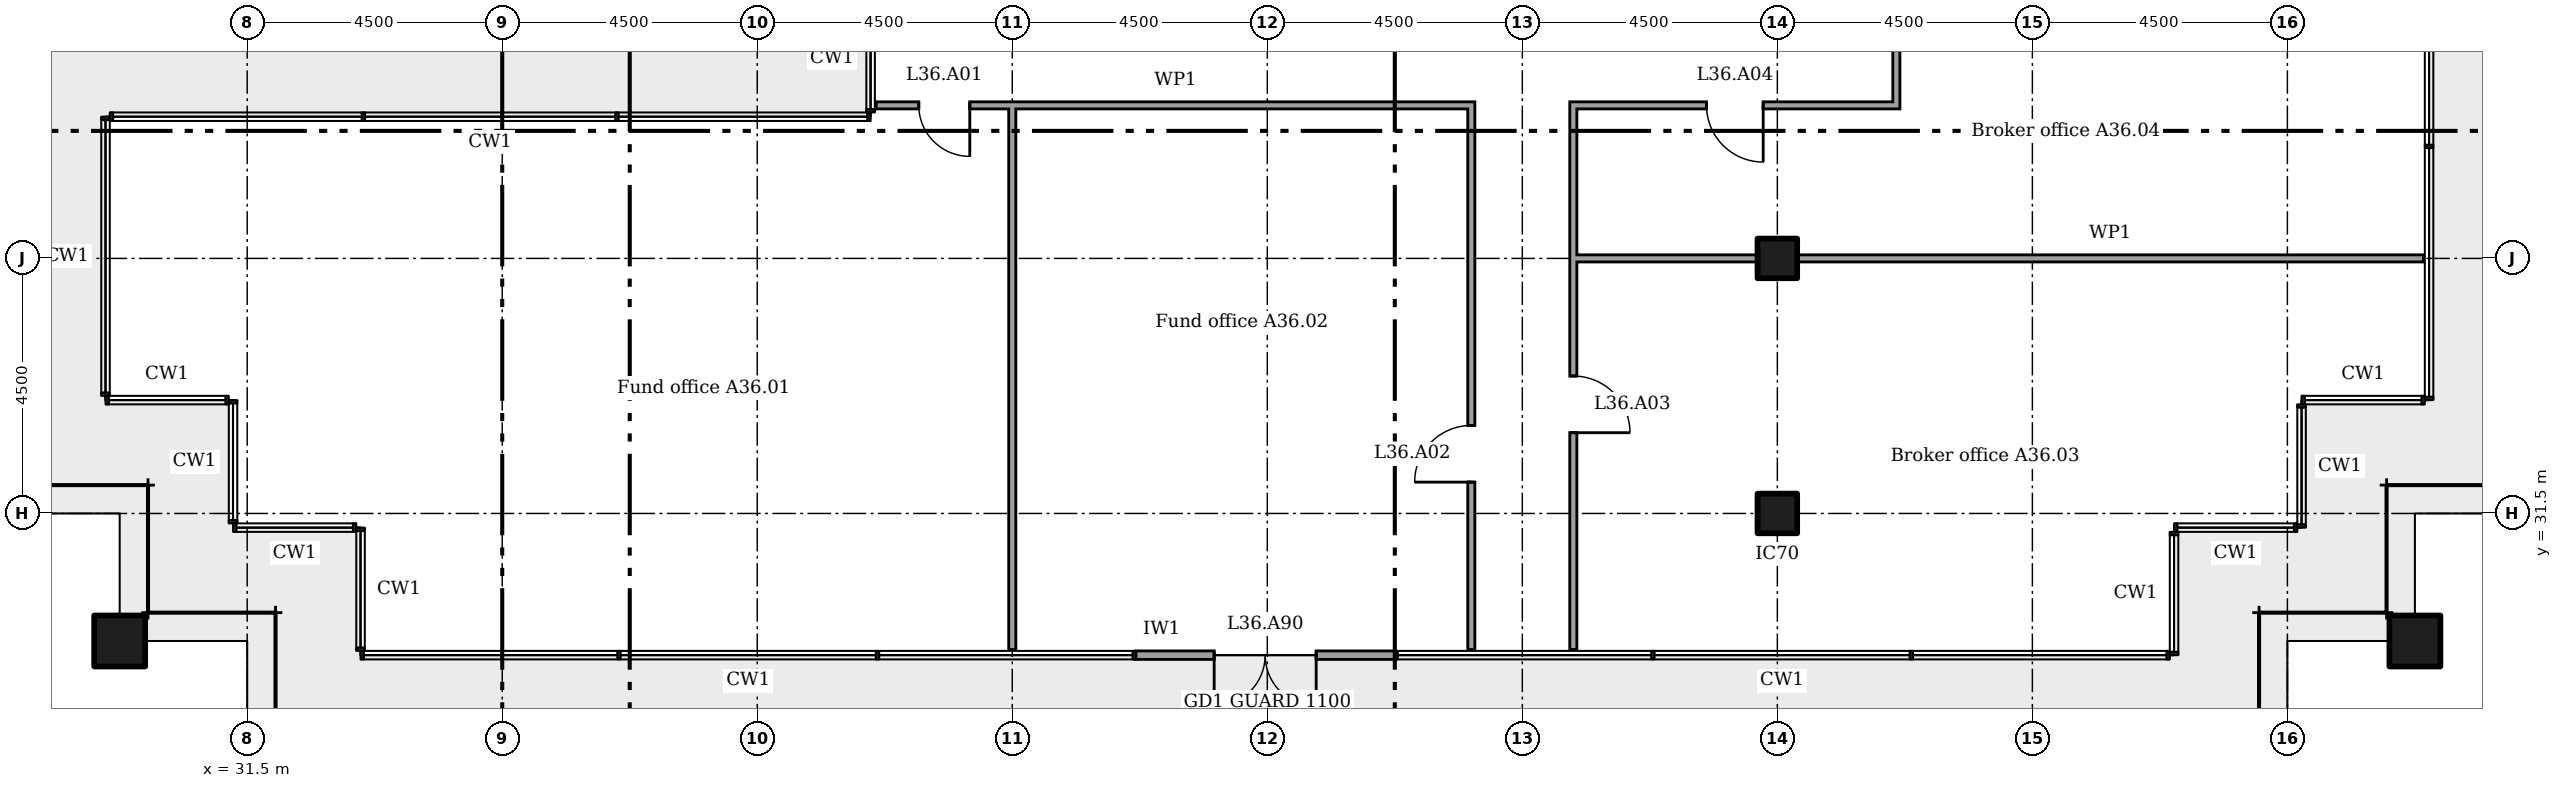
"""IFC4 building model, lengths in metres.
Left out: names, types, materials, properties, quantities, classifications, styles, units other than length and angle.
Written with IfcOpenShell. Run it as: python <this file> out.ifc"""

import sys

from ifc_helpers import new_model, si_unit, direction, frame, frame_2d, origin, origin_2d, place, context, subcontext, project, spatial, rectangle, extrude, element, fill, save


model = new_model("IFC4")
c1 = context("Model", 3, precision=1e-05, world=origin(), true_north=direction((0.0, 1.0)))
c2 = subcontext(c1, "Body", "Model", "MODEL_VIEW")
j1 = project(units=[si_unit("LENGTHUNIT", "METRE"), si_unit("PLANEANGLEUNIT", "RADIAN")], contexts=[c1])
p1 = place(None, origin())
s1 = spatial("IfcSite", under=j1, at=p1, CompositionType="ELEMENT")
p2 = place(p1, origin())
s2 = spatial("IfcBuilding", under=s1, at=p2, CompositionType="ELEMENT")
p3 = place(p2, frame((0.0, 0.0, 147.4)))
s3 = spatial("IfcBuildingStorey", under=s2, at=p3, CompositionType="ELEMENT", Elevation=147.4)
for number, where in (
    (1, (69.75, 29.25, 0.0)),
    (2, (29.25, 29.25, 0.0)),
):
    element("IfcColumn", number, at=place(p3, frame(where)), inside=s3, PredefinedType="COLUMN", context=c2, shape_type="SweptSolid", body=[
        extrude(rectangle(XDim=0.9, YDim=0.9, at=origin_2d()), origin(), (0.0, 0.0, 1.0), 3.6),
    ])
for number, where in (
    (3, (58.5, 31.5, 0.0)),
    (4, (58.5, 36.0, 0.0)),
):
    element("IfcColumn", number, at=place(p3, frame(where)), inside=s3, PredefinedType="COLUMN", context=c2, shape_type="SweptSolid", body=[
        extrude(rectangle(XDim=0.7, YDim=0.7, at=origin_2d()), origin(), (0.0, 0.0, 1.0), 3.6),
    ])
p4 = place(p3, frame((47.182, 29.0, 0.0)))
e5 = element("IfcWall", 5, at=p4, inside=s3, PredefinedType="SOLIDWALL", context=c2, shape_type="SweptSolid", body=[
    extrude(rectangle(XDim=4.561, YDim=0.15, at=frame_2d((2.28, 0.0))), origin(), (0.0, 0.0, 1.0), 3.45),
])
p5 = place(p4, frame((1.38, 0.0, 0.0)))
e6 = element("IfcOpeningElement", 6, at=p5, cuts=e5, PredefinedType="OPENING", context=c2, shape_type="SweptSolid", body=[
    extrude(rectangle(XDim=1.8, YDim=2.4, at=frame_2d((0.9, 1.2))), frame((0.0, 0.085, 0.0), z_axis=(0.0, -1.0, 0.0), x_axis=(1.0, 0.0, 0.0)), (0.0, 0.0, 1.0), 0.17),
])
p6 = place(p3, frame((54.9, 36.0, 0.0)))
e7 = element("IfcWall", 7, at=p6, inside=s3, PredefinedType="PARTITIONING", context=c2, shape_type="SweptSolid", body=[
    extrude(rectangle(XDim=3.25, YDim=0.125, at=frame_2d((1.625, 0.0))), origin(), (0.0, 0.0, 1.0), 3.45),
])
p7 = place(p3, frame((58.85, 36.0, 0.0)))
e8 = element("IfcWall", 8, at=p7, inside=s3, PredefinedType="PARTITIONING", context=c2, shape_type="SweptSolid", body=[
    extrude(rectangle(XDim=11.05, YDim=0.125, at=frame_2d((5.525, 0.0))), origin(), (0.0, 0.0, 1.0), 2.766),
])
p8 = place(p3, frame((42.6, 38.7, 0.0)))
e9 = element("IfcWall", 9, at=p8, inside=s3, PredefinedType="PARTITIONING", context=c2, shape_type="SweptSolid", body=[
    extrude(rectangle(XDim=10.562, YDim=0.125, at=frame_2d((5.281, 0.0))), origin(), (0.0, 0.0, 1.0), 3.45),
])
p9 = place(p8, frame((0.75, 0.0, 0.0)))
e10 = element("IfcOpeningElement", 10, at=p9, cuts=e9, PredefinedType="OPENING", context=c2, shape_type="SweptSolid", body=[
    extrude(rectangle(XDim=0.9, YDim=2.1, at=frame_2d((0.45, 1.05))), frame((0.0, 0.073, 0.0), z_axis=(0.0, -1.0, 0.0), x_axis=(1.0, 0.0, 0.0)), (0.0, 0.0, 1.0), 0.145),
])
p10 = place(p3, frame((54.837, 38.7, 0.0)))
e11 = element("IfcWall", 11, at=p10, inside=s3, PredefinedType="PARTITIONING", context=c2, shape_type="SweptSolid", body=[
    extrude(rectangle(XDim=5.825, YDim=0.125, at=frame_2d((2.913, 0.0))), origin(), (0.0, 0.0, 1.0), 3.45),
])
p11 = place(p10, frame((2.413, 0.0, 0.0)))
e12 = element("IfcOpeningElement", 12, at=p11, cuts=e11, PredefinedType="OPENING", context=c2, shape_type="SweptSolid", body=[
    extrude(rectangle(XDim=1.0, YDim=2.1, at=frame_2d((0.5, 1.05))), frame((0.0, 0.073, 0.0), z_axis=(0.0, -1.0, 0.0), x_axis=(1.0, 0.0, 0.0)), (0.0, 0.0, 1.0), 0.145),
])
p12 = place(p3, frame((45.0, 29.1, 0.0), z_axis=(0.0, 0.0, 1.0), x_axis=(0.0, 1.0, 0.0)))
e13 = element("IfcWall", 13, at=p12, inside=s3, PredefinedType="PARTITIONING", context=c2, shape_type="SweptSolid", body=[
    extrude(rectangle(XDim=9.6, YDim=0.125, at=frame_2d((4.8, 0.0))), origin(), (0.0, 0.0, 1.0), 2.766),
])
p13 = place(p3, frame((53.1, 29.1, 0.0), z_axis=(0.0, 0.0, 1.0), x_axis=(0.0, 1.0, 0.0)))
e14 = element("IfcWall", 14, at=p13, inside=s3, PredefinedType="PARTITIONING", context=c2, shape_type="SweptSolid", body=[
    extrude(rectangle(XDim=9.537, YDim=0.125, at=frame_2d((4.769, 0.0))), origin(), (0.0, 0.0, 1.0), 3.45),
])
p14 = place(p13, frame((2.953, 0.0, 0.0)))
e15 = element("IfcOpeningElement", 15, at=p14, cuts=e14, PredefinedType="OPENING", context=c2, shape_type="SweptSolid", body=[
    extrude(rectangle(XDim=1.0, YDim=2.1, at=frame_2d((0.5, 1.05))), frame((0.0, 0.073, 0.0), z_axis=(0.0, -1.0, 0.0), x_axis=(1.0, 0.0, 0.0)), (0.0, 0.0, 1.0), 0.145),
])
p15 = place(p3, frame((54.9, 29.1, 0.0), z_axis=(0.0, 0.0, 1.0), x_axis=(0.0, 1.0, 0.0)))
e16 = element("IfcWall", 16, at=p15, inside=s3, PredefinedType="PARTITIONING", context=c2, shape_type="SweptSolid", body=[
    extrude(rectangle(XDim=9.537, YDim=0.125, at=frame_2d((4.769, 0.0))), origin(), (0.0, 0.0, 1.0), 3.45),
])
p16 = place(p15, frame((3.825, 0.0, 0.0)))
e17 = element("IfcOpeningElement", 17, at=p16, cuts=e16, PredefinedType="OPENING", context=c2, shape_type="SweptSolid", body=[
    extrude(rectangle(XDim=1.0, YDim=2.1, at=frame_2d((0.5, 1.05))), frame((0.0, 0.073, 0.0), z_axis=(0.0, -1.0, 0.0), x_axis=(1.0, 0.0, 0.0)), (0.0, 0.0, 1.0), 0.145),
])
p17 = place(p3, frame((60.6, 38.762, 0.0), z_axis=(0.0, 0.0, 1.0), x_axis=(0.0, 1.0, 0.0)))
e18 = element("IfcWall", 18, at=p17, inside=s3, PredefinedType="PARTITIONING", context=c2, shape_type="SweptSolid", body=[
    extrude(rectangle(XDim=22.075, YDim=0.125, at=frame_2d((11.038, 0.0))), origin(), (0.0, 0.0, 1.0), 3.45),
])
p18 = place(p17, frame((3.032, 0.0, 0.0)))
e19 = element("IfcOpeningElement", 19, at=p18, cuts=e18, PredefinedType="OPENING", context=c2, shape_type="SweptSolid", body=[
    extrude(rectangle(XDim=1.0, YDim=2.1, at=frame_2d((0.5, 1.05))), frame((0.0, 0.073, 0.0), z_axis=(0.0, -1.0, 0.0), x_axis=(1.0, 0.0, 0.0)), (0.0, 0.0, 1.0), 0.145),
])
p19 = place(p17, frame((8.442, 0.0, 0.0)))
e20 = element("IfcOpeningElement", 20, at=p19, cuts=e18, PredefinedType="OPENING", context=c2, shape_type="SweptSolid", body=[
    extrude(rectangle(XDim=1.0, YDim=2.1, at=frame_2d((0.5, 1.05))), frame((0.0, 0.073, 0.0), z_axis=(0.0, -1.0, 0.0), x_axis=(1.0, 0.0, 0.0)), (0.0, 0.0, 1.0), 0.145),
])
p20 = place(p17, frame((12.488, 0.0, 0.0)))
e21 = element("IfcOpeningElement", 21, at=p20, cuts=e18, PredefinedType="OPENING", context=c2, shape_type="SweptSolid", body=[
    extrude(rectangle(XDim=1.0, YDim=2.1, at=frame_2d((0.5, 1.05))), frame((0.0, 0.073, 0.0), z_axis=(0.0, -1.0, 0.0), x_axis=(1.0, 0.0, 0.0)), (0.0, 0.0, 1.0), 0.145),
])
p21 = place(p17, frame((16.532, 0.0, 0.0)))
e22 = element("IfcOpeningElement", 22, at=p21, cuts=e18, PredefinedType="OPENING", context=c2, shape_type="SweptSolid", body=[
    extrude(rectangle(XDim=1.0, YDim=2.1, at=frame_2d((0.5, 1.05))), frame((0.0, 0.073, 0.0), z_axis=(0.0, -1.0, 0.0), x_axis=(1.0, 0.0, 0.0)), (0.0, 0.0, 1.0), 0.145),
])
p22 = place(p17, frame((20.663, 0.0, 0.0)))
e23 = element("IfcOpeningElement", 23, at=p22, cuts=e18, PredefinedType="OPENING", context=c2, shape_type="SweptSolid", body=[
    extrude(rectangle(XDim=0.9, YDim=2.1, at=frame_2d((0.45, 1.05))), frame((0.0, 0.073, 0.0), z_axis=(0.0, -1.0, 0.0), x_axis=(1.0, 0.0, 0.0)), (0.0, 0.0, 1.0), 0.145),
])
p23 = place(p5, frame((1.8, 0.0, 0.0), x_axis=(-1.0, 0.0, 0.0)))
e24 = element("IfcDoor", 24, at=p23, inside=s3, OperationType="DOUBLE_DOOR_DOUBLE_SWING", PredefinedType="NOTDEFINED", context=c2, shape_type="SweptSolid", body=[
    extrude(rectangle(XDim=1.8, YDim=2.4, at=frame_2d((0.9, 1.2))), frame((0.0, 0.025, 0.0), z_axis=(0.0, -1.0, 0.0), x_axis=(1.0, 0.0, 0.0)), (0.0, 0.0, 1.0), 0.05),
])
fill(e6, e24)
p24 = place(p9, frame((0.9, 0.0, 0.0), x_axis=(-1.0, 0.0, 0.0)))
e25 = element("IfcDoor", 25, at=p24, inside=s3, OperationType="SINGLE_SWING_RIGHT", PredefinedType="DOOR", context=c2, shape_type="SweptSolid", body=[
    extrude(rectangle(XDim=0.9, YDim=2.1, at=frame_2d((0.45, 1.05))), frame((0.0, 0.025, 0.0), z_axis=(0.0, -1.0, 0.0), x_axis=(1.0, 0.0, 0.0)), (0.0, 0.0, 1.0), 0.05),
])
fill(e10, e25)
p25 = place(p14, origin())
e26 = element("IfcDoor", 26, at=p25, inside=s3, OperationType="SINGLE_SWING_RIGHT", PredefinedType="DOOR", context=c2, shape_type="SweptSolid", body=[
    extrude(rectangle(XDim=1.0, YDim=2.1, at=frame_2d((0.5, 1.05))), frame((0.0, 0.025, 0.0), z_axis=(0.0, -1.0, 0.0), x_axis=(1.0, 0.0, 0.0)), (0.0, 0.0, 1.0), 0.05),
])
fill(e15, e26)
p26 = place(p16, frame((1.0, 0.0, 0.0), x_axis=(-1.0, 0.0, 0.0)))
e27 = element("IfcDoor", 27, at=p26, inside=s3, OperationType="SINGLE_SWING_LEFT", PredefinedType="DOOR", context=c2, shape_type="SweptSolid", body=[
    extrude(rectangle(XDim=1.0, YDim=2.1, at=frame_2d((0.5, 1.05))), frame((0.0, 0.025, 0.0), z_axis=(0.0, -1.0, 0.0), x_axis=(1.0, 0.0, 0.0)), (0.0, 0.0, 1.0), 0.05),
])
fill(e17, e27)
p27 = place(p11, frame((1.0, 0.0, 0.0), x_axis=(-1.0, 0.0, 0.0)))
e28 = element("IfcDoor", 28, at=p27, inside=s3, OperationType="SINGLE_SWING_RIGHT", PredefinedType="DOOR", context=c2, shape_type="SweptSolid", body=[
    extrude(rectangle(XDim=1.0, YDim=2.1, at=frame_2d((0.5, 1.05))), frame((0.0, 0.025, 0.0), z_axis=(0.0, -1.0, 0.0), x_axis=(1.0, 0.0, 0.0)), (0.0, 0.0, 1.0), 0.05),
])
fill(e12, e28)
save(model, sys.argv[1])
